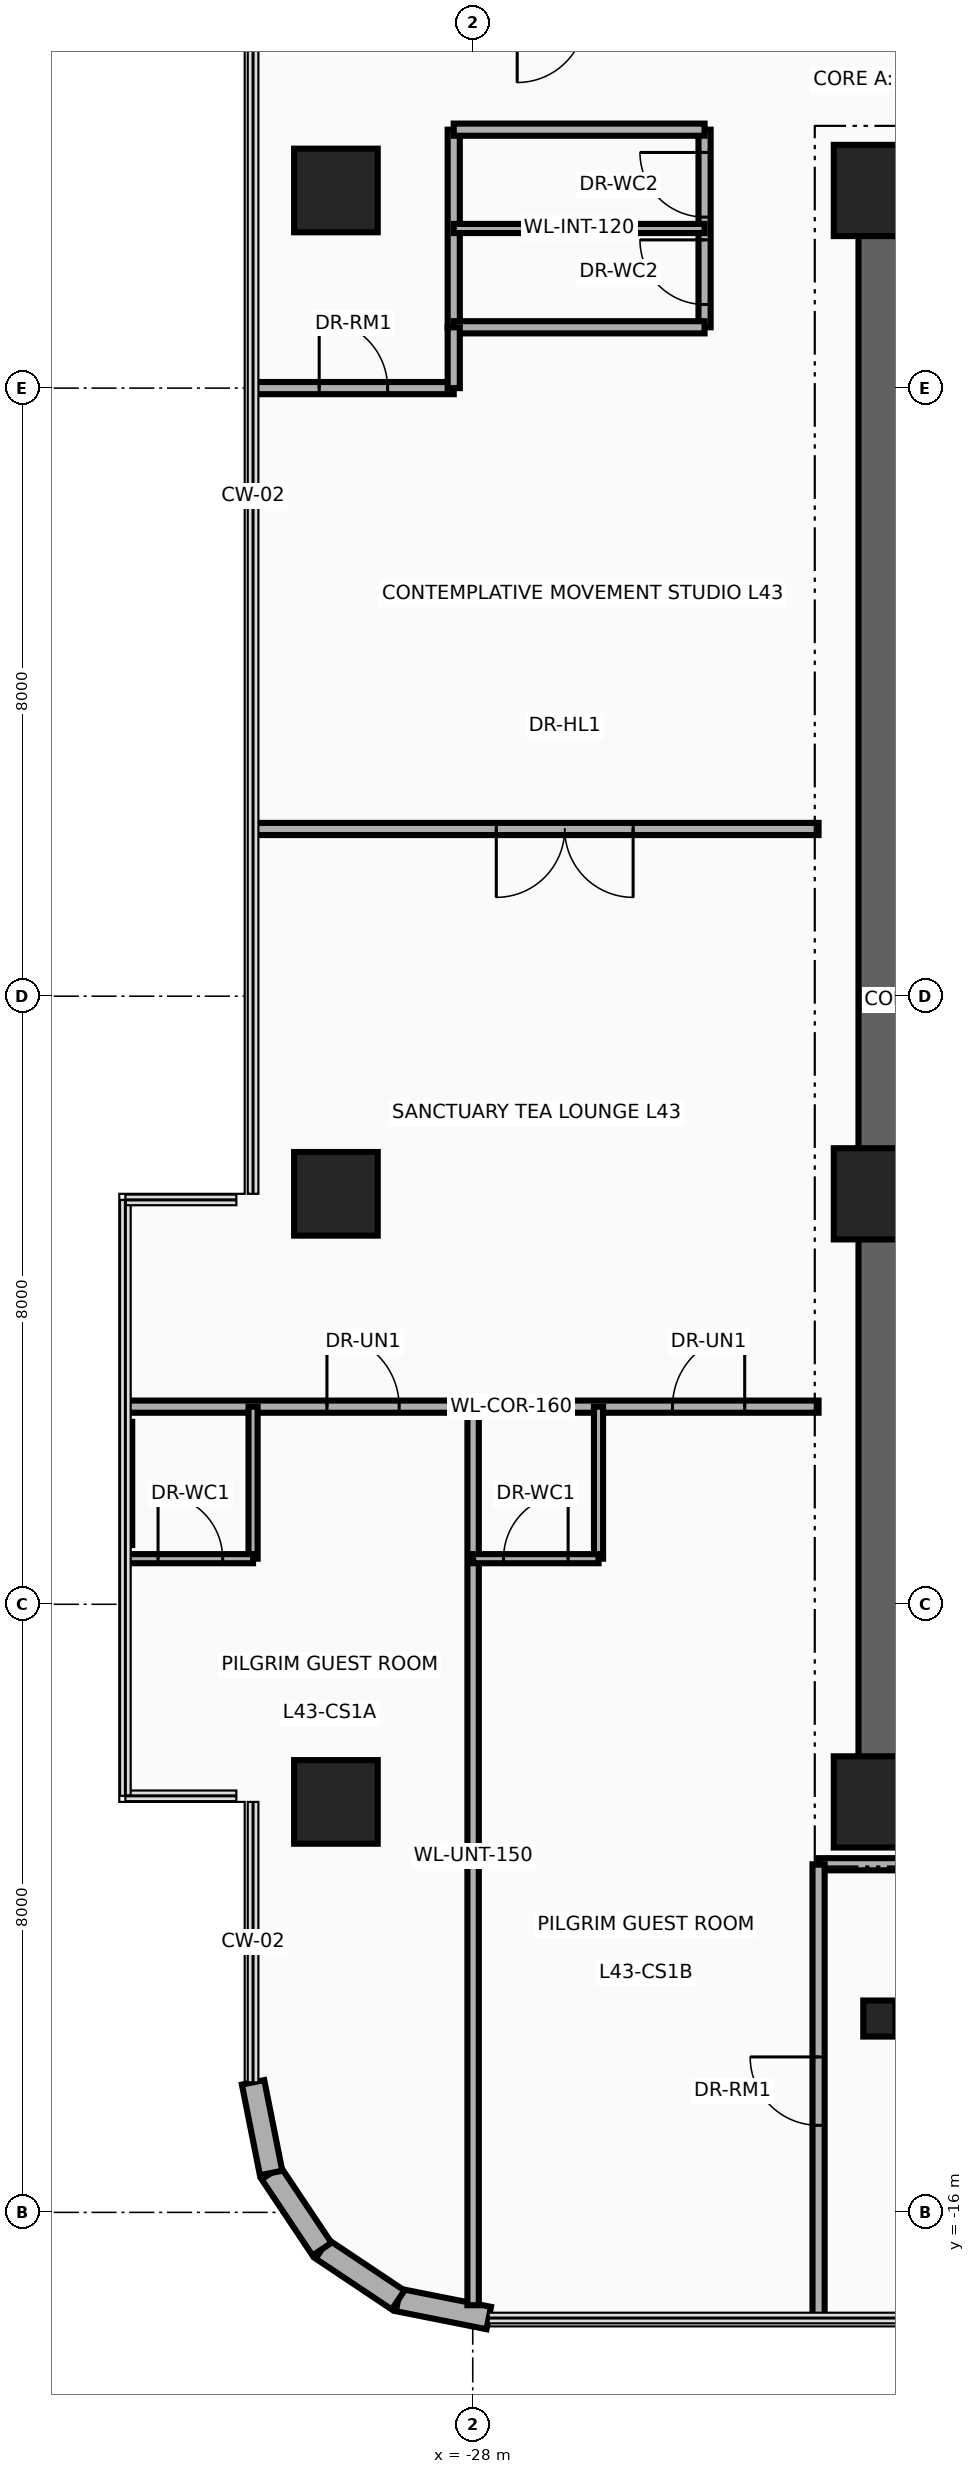
"""IFC4 building model, lengths in metres.
Left out: names, types, materials, properties, quantities, classifications, styles, units other than length and angle.
Written with IfcOpenShell. Run it as: python <this file> out.ifc"""

import sys

from ifc_helpers import new_model, si_unit, direction, frame, frame_2d, origin, origin_2d, place, context, subcontext, project, spatial, rectangle, circle, i_section, extrude, source, transform, mapped, element, fill, save


model = new_model("IFC4")
c1 = context("Model", 3, precision=1e-05, world=origin(), true_north=direction((0.0, 1.0)))
c2 = subcontext(c1, "Body", "Model", "MODEL_VIEW")
j1 = project(units=[si_unit("LENGTHUNIT", "METRE"), si_unit("PLANEANGLEUNIT", "RADIAN")], contexts=[c1])
p1 = place(None, origin())
s1 = spatial("IfcSite", under=j1, at=p1, CompositionType="ELEMENT")
p2 = place(p1, origin())
s2 = spatial("IfcBuilding", under=s1, at=p2, CompositionType="ELEMENT")
p3 = place(p2, frame((0.0, 0.0, 168.6)))
s3 = spatial("IfcBuildingStorey", under=s2, at=p3, CompositionType="ELEMENT", Elevation=168.6)
p4 = place(p3, frame((-22.65, -11.075, 0.0), z_axis=(0.0, 0.0, 1.0), x_axis=(0.0, 1.0, 0.0)))
e1 = element("IfcWall", 1, at=p4, inside=s3, PredefinedType="SHEAR", context=c2, shape_type="SweptSolid", body=[
    extrude(rectangle(XDim=22.15, YDim=0.55, at=frame_2d((11.075, 0.0))), origin(), (0.0, 0.0, 1.0), 3.3),
])
for number, where, z_axis, x_axis in (
    (2, (-22.65, 10.8, 0.0), (0.0, 0.0, 1.0), (1.0, 0.0, 0.0)),
    (3, (-22.65, -10.8, 0.0), (0.0, 0.0, 1.0), (1.0, 0.0, 0.0)),
):
    element("IfcWall", number, at=place(p3, frame(where, z_axis=z_axis, x_axis=x_axis)), inside=s3, PredefinedType="SHEAR", context=c2, shape_type="SweptSolid", body=[
        extrude(rectangle(XDim=10.25, YDim=0.55, at=frame_2d((5.125, 0.0))), origin(), (0.0, 0.0, 1.0), 3.3),
    ])
m1 = source(origin(), c2, "Body", "SweptSolid", [
    extrude(circle(Radius=0.55, at=origin_2d()), origin(), (0.0, 0.0, 1.0), 3.7),
])
p5 = place(p3, frame((-29.8, -10.6, 0.0), z_axis=(0.0, 0.0, 1.0), x_axis=(1.0, 0.0, 0.0)))
e4 = element("IfcColumn", 4, at=p5, inside=s3, PredefinedType="COLUMN", context=c2, shape_type="MappedRepresentation", body=[
    mapped(m1, transform((0.0, 0.0, 0.0), x_axis=(1.0, 0.0, 0.0), y_axis=(0.0, 1.0, 0.0), z_axis=(0.0, 0.0, 1.0), scale=1.0)),
])
m2 = source(origin(), c2, "Body", "SweptSolid", [
    extrude(rectangle(XDim=1.2, YDim=1.2, at=origin_2d()), origin(), (0.0, 0.0, 1.0), 3.7),
])
p6 = place(p3, frame((-22.65, -10.6, 0.0), z_axis=(0.0, 0.0, 1.0), x_axis=(1.0, 0.0, 0.0)))
e5 = element("IfcColumn", 5, at=p6, inside=s3, PredefinedType="COLUMN", context=c2, shape_type="MappedRepresentation", body=[
    mapped(m2, transform((0.0, 0.0, 0.0), x_axis=(1.0, 0.0, 0.0), y_axis=(0.0, 1.0, 0.0), z_axis=(0.0, 0.0, 1.0), scale=1.0)),
])
p7 = place(p3, frame((-29.8, -2.6, 0.0), z_axis=(0.0, 0.0, 1.0), x_axis=(1.0, 0.0, 0.0)))
e6 = element("IfcColumn", 6, at=p7, inside=s3, PredefinedType="COLUMN", context=c2, shape_type="MappedRepresentation", body=[
    mapped(m1, transform((0.0, 0.0, 0.0), x_axis=(1.0, 0.0, 0.0), y_axis=(0.0, 1.0, 0.0), z_axis=(0.0, 0.0, 1.0), scale=1.0)),
])
p8 = place(p3, frame((-22.65, -2.6, 0.0), z_axis=(0.0, 0.0, 1.0), x_axis=(1.0, 0.0, 0.0)))
e7 = element("IfcColumn", 7, at=p8, inside=s3, PredefinedType="COLUMN", context=c2, shape_type="MappedRepresentation", body=[
    mapped(m2, transform((0.0, 0.0, 0.0), x_axis=(1.0, 0.0, 0.0), y_axis=(0.0, 1.0, 0.0), z_axis=(0.0, 0.0, 1.0), scale=1.0)),
])
p9 = place(p3, frame((-29.8, 10.6, 0.0), z_axis=(0.0, 0.0, 1.0), x_axis=(1.0, 0.0, 0.0)))
e8 = element("IfcColumn", 8, at=p9, inside=s3, PredefinedType="COLUMN", context=c2, shape_type="MappedRepresentation", body=[
    mapped(m1, transform((0.0, 0.0, 0.0), x_axis=(1.0, 0.0, 0.0), y_axis=(0.0, 1.0, 0.0), z_axis=(0.0, 0.0, 1.0), scale=1.0)),
])
p10 = place(p3, frame((-22.65, 10.6, 0.0), z_axis=(0.0, 0.0, 1.0), x_axis=(1.0, 0.0, 0.0)))
e9 = element("IfcColumn", 9, at=p10, inside=s3, PredefinedType="COLUMN", context=c2, shape_type="MappedRepresentation", body=[
    mapped(m2, transform((0.0, 0.0, 0.0), x_axis=(1.0, 0.0, 0.0), y_axis=(0.0, 1.0, 0.0), z_axis=(0.0, 0.0, 1.0), scale=1.0)),
])
m3 = source(origin(), c2, "Body", "SweptSolid", [
    extrude(i_section(OverallWidth=0.424, OverallDepth=0.474, WebThickness=0.048, FlangeThickness=0.077, at=origin_2d()), origin(), (0.0, 0.0, 1.0), 3.7),
])
p11 = place(p3, frame((-22.65, -13.45, 0.0), z_axis=(0.0, 0.0, 1.0), x_axis=(1.0, 0.0, 0.0)))
e10 = element("IfcColumn", 10, at=p11, inside=s3, PredefinedType="COLUMN", context=c2, shape_type="MappedRepresentation", body=[
    mapped(m3, transform((0.0, 0.0, 0.0), x_axis=(1.0, 0.0, 0.0), y_axis=(0.0, 1.0, 0.0), z_axis=(0.0, 0.0, 1.0), scale=1.0)),
])
p12 = place(p3, frame((-27.789, -17.39, 0.0), z_axis=(0.0, 0.0, 1.0), x_axis=(-0.980804027463, 0.194996050505, 0.0)))
e11 = element("IfcWall", 11, at=p12, inside=s3, PredefinedType="SOLIDWALL", context=c2, shape_type="SweptSolid", body=[
    extrude(rectangle(XDim=1.216, YDim=0.3, at=frame_2d((0.608, 0.0))), origin(), (0.0, 0.0, 1.0), 3.3),
])
for number, where, z_axis, x_axis in (
    (12, (-28.982, -17.153, 0.0), (0.0, 0.0, 1.0), (-0.831, 0.556, 0.0)),
    (13, (-29.983, -16.483, 0.0), (0.0, 0.0, 1.0), (-0.556, 0.831, 0.0)),
):
    element("IfcWall", number, at=place(p3, frame(where, z_axis=z_axis, x_axis=x_axis)), inside=s3, PredefinedType="SOLIDWALL", context=c2, shape_type="SweptSolid", body=[
        extrude(rectangle(XDim=1.205, YDim=0.3, at=frame_2d((0.603, 0.0))), origin(), (0.0, 0.0, 1.0), 3.3),
    ])
p13 = place(p3, frame((-30.653, -15.482, 0.0), z_axis=(0.0, 0.0, 1.0), x_axis=(-0.194996050505, 0.980804027463, 0.0)))
e14 = element("IfcWall", 14, at=p13, inside=s3, PredefinedType="SOLIDWALL", context=c2, shape_type="SweptSolid", body=[
    extrude(rectangle(XDim=1.216, YDim=0.3, at=frame_2d((0.608, 0.0))), origin(), (0.0, 0.0, 1.0), 3.3),
])
p14 = place(p3, frame((-28.25, 8.8, 0.0), z_axis=(0.0, 0.0, 1.0), x_axis=(0.0, 1.0, 0.0)))
e15 = element("IfcWall", 15, at=p14, inside=s3, PredefinedType="PARTITIONING", context=c2, shape_type="SweptSolid", body=[
    extrude(rectangle(XDim=2.6, YDim=0.16, at=frame_2d((1.3, 0.0))), origin(), (0.0, 0.0, 1.0), 2.085),
])
p15 = place(p3, frame((-24.95, 8.8, 0.0), z_axis=(0.0, 0.0, 1.0), x_axis=(0.0, 1.0, 0.0)))
e16 = element("IfcWall", 16, at=p15, inside=s3, PredefinedType="PARTITIONING", context=c2, shape_type="SweptSolid", body=[
    extrude(rectangle(XDim=2.6, YDim=0.16, at=frame_2d((1.3, 0.0))), origin(), (0.0, 0.0, 1.0), 2.085),
])
p16 = place(p15, frame((0.3, 0.0, 0.0)))
e17 = element("IfcOpeningElement", 17, at=p16, cuts=e16, PredefinedType="OPENING", context=c2, shape_type="SweptSolid", body=[
    extrude(rectangle(XDim=0.85, YDim=2.04, at=frame_2d((0.425, 1.02))), frame((0.0, 0.095, 0.0), z_axis=(0.0, -1.0, 0.0), x_axis=(1.0, 0.0, 0.0)), (0.0, 0.0, 1.0), 0.19),
])
p17 = place(p15, frame((1.45, 0.0, 0.0)))
e18 = element("IfcOpeningElement", 18, at=p17, cuts=e16, PredefinedType="OPENING", context=c2, shape_type="SweptSolid", body=[
    extrude(rectangle(XDim=0.85, YDim=2.04, at=frame_2d((0.425, 1.02))), frame((0.0, 0.095, 0.0), z_axis=(0.0, -1.0, 0.0), x_axis=(1.0, 0.0, 0.0)), (0.0, 0.0, 1.0), 0.19),
])
for number, where, z_axis, x_axis in (
    (19, (-28.25, 8.8, 0.0), (0.0, 0.0, 1.0), (1.0, 0.0, 0.0)),
    (20, (-28.25, 11.4, 0.0), (0.0, 0.0, 1.0), (1.0, 0.0, 0.0)),
):
    element("IfcWall", number, at=place(p3, frame(where, z_axis=z_axis, x_axis=x_axis)), inside=s3, PredefinedType="PARTITIONING", context=c2, shape_type="SweptSolid", body=[
        extrude(rectangle(XDim=3.3, YDim=0.16, at=frame_2d((1.65, 0.0))), origin(), (0.0, 0.0, 1.0), 3.3),
    ])
p18 = place(p3, frame((-28.25, 10.1, 0.0), z_axis=(0.0, 0.0, 1.0), x_axis=(1.0, 0.0, 0.0)))
e21 = element("IfcWall", 21, at=p18, inside=s3, PredefinedType="PARTITIONING", context=c2, shape_type="SweptSolid", body=[
    extrude(rectangle(XDim=3.3, YDim=0.12, at=frame_2d((1.65, 0.0))), origin(), (0.0, 0.0, 1.0), 2.085),
])
p19 = place(p3, frame((-23.45, -11.42, 0.0), z_axis=(0.0, 0.0, 1.0), x_axis=(1.0, 0.0, 0.0)))
e22 = element("IfcWall", 22, at=p19, inside=s3, PredefinedType="PARTITIONING", context=c2, shape_type="SweptSolid", body=[
    extrude(rectangle(XDim=13.84, YDim=0.16, at=frame_2d((6.92, 0.0))), origin(), (0.0, 0.0, 1.0), 2.674),
])
p20 = place(p3, frame((-23.45, -17.39, 0.0), z_axis=(0.0, 0.0, 1.0), x_axis=(0.0, 1.0, 0.0)))
e23 = element("IfcWall", 23, at=p20, inside=s3, PredefinedType="PARTITIONING", context=c2, shape_type="SweptSolid", body=[
    extrude(rectangle(XDim=5.97, YDim=0.16, at=frame_2d((2.985, 0.0))), origin(), (0.0, 0.0, 1.0), 3.3),
])
p21 = place(p20, frame((2.535, 0.0, 0.0)))
e24 = element("IfcOpeningElement", 24, at=p21, cuts=e23, PredefinedType="OPENING", context=c2, shape_type="SweptSolid", body=[
    extrude(rectangle(XDim=0.9, YDim=2.1, at=frame_2d((0.45, 1.05))), frame((0.0, 0.095, 0.0), z_axis=(0.0, -1.0, 0.0), x_axis=(1.0, 0.0, 0.0)), (0.0, 0.0, 1.0), 0.19),
])
p22 = place(p3, frame((-32.54, -5.4, 0.0), z_axis=(0.0, 0.0, 1.0), x_axis=(1.0, 0.0, 0.0)))
e25 = element("IfcWall", 25, at=p22, inside=s3, PredefinedType="PARTITIONING", context=c2, shape_type="SweptSolid", body=[
    extrude(rectangle(XDim=9.09, YDim=0.16, at=frame_2d((4.545, 0.0))), origin(), (0.0, 0.0, 1.0), 2.746),
])
p23 = place(p22, frame((2.622, 0.0, 0.0)))
e26 = element("IfcOpeningElement", 26, at=p23, cuts=e25, PredefinedType="OPENING", context=c2, shape_type="SweptSolid", body=[
    extrude(rectangle(XDim=0.95, YDim=2.15, at=frame_2d((0.475, 1.075))), frame((0.0, 0.095, 0.0), z_axis=(0.0, -1.0, 0.0), x_axis=(1.0, 0.0, 0.0)), (0.0, 0.0, 1.0), 0.19),
])
p24 = place(p22, frame((7.168, 0.0, 0.0)))
e27 = element("IfcOpeningElement", 27, at=p24, cuts=e25, PredefinedType="OPENING", context=c2, shape_type="SweptSolid", body=[
    extrude(rectangle(XDim=0.95, YDim=2.15, at=frame_2d((0.475, 1.075))), frame((0.0, 0.095, 0.0), z_axis=(0.0, -1.0, 0.0), x_axis=(1.0, 0.0, 0.0)), (0.0, 0.0, 1.0), 0.19),
])
p25 = place(p3, frame((-30.89, 8.0, 0.0), z_axis=(0.0, 0.0, 1.0), x_axis=(1.0, 0.0, 0.0)))
e28 = element("IfcWall", 28, at=p25, inside=s3, PredefinedType="PARTITIONING", context=c2, shape_type="SweptSolid", body=[
    extrude(rectangle(XDim=2.64, YDim=0.16, at=frame_2d((1.32, 0.0))), origin(), (0.0, 0.0, 1.0), 2.746),
])
p26 = place(p25, frame((0.87, 0.0, 0.0)))
e29 = element("IfcOpeningElement", 29, at=p26, cuts=e28, PredefinedType="OPENING", context=c2, shape_type="SweptSolid", body=[
    extrude(rectangle(XDim=0.9, YDim=2.1, at=frame_2d((0.45, 1.05))), frame((0.0, 0.095, 0.0), z_axis=(0.0, -1.0, 0.0), x_axis=(1.0, 0.0, 0.0)), (0.0, 0.0, 1.0), 0.19),
])
p27 = place(p3, frame((-28.25, 8.0, 0.0), z_axis=(0.0, 0.0, 1.0), x_axis=(0.0, 1.0, 0.0)))
e30 = element("IfcWall", 30, at=p27, inside=s3, PredefinedType="PARTITIONING", context=c2, shape_type="SweptSolid", body=[
    extrude(rectangle(XDim=0.8, YDim=0.16, at=frame_2d((0.4, 0.0))), origin(), (0.0, 0.0, 1.0), 2.828),
])
p28 = place(p3, frame((-27.995, -17.222, 0.0), z_axis=(0.0, 0.0, 1.0), x_axis=(0.0, 1.0, 0.0)))
e31 = element("IfcWall", 31, at=p28, inside=s3, PredefinedType="PARTITIONING", context=c2, shape_type="SweptSolid", body=[
    extrude(rectangle(XDim=11.822, YDim=0.15, at=frame_2d((5.911, 0.0))), origin(), (0.0, 0.0, 1.0), 2.085),
])
p29 = place(p3, frame((-30.89, -7.4, 0.0), z_axis=(0.0, 0.0, 1.0), x_axis=(0.0, 1.0, 0.0)))
e32 = element("IfcWall", 32, at=p29, inside=s3, PredefinedType="PARTITIONING", context=c2, shape_type="SweptSolid", body=[
    extrude(rectangle(XDim=2.0, YDim=0.12, at=frame_2d((1.0, 0.0))), origin(), (0.0, 0.0, 1.0), 3.3),
])
p30 = place(p3, frame((-32.54, -7.4, 0.0), z_axis=(0.0, 0.0, 1.0), x_axis=(1.0, 0.0, 0.0)))
e33 = element("IfcWall", 33, at=p30, inside=s3, PredefinedType="PARTITIONING", context=c2, shape_type="SweptSolid", body=[
    extrude(rectangle(XDim=1.65, YDim=0.12, at=frame_2d((0.825, 0.0))), origin(), (0.0, 0.0, 1.0), 3.3),
])
p31 = place(p30, frame((0.4, 0.0, 0.0)))
e34 = element("IfcOpeningElement", 34, at=p31, cuts=e33, PredefinedType="OPENING", context=c2, shape_type="SweptSolid", body=[
    extrude(rectangle(XDim=0.85, YDim=2.1, at=frame_2d((0.425, 1.05))), frame((0.0, 0.075, 0.0), z_axis=(0.0, -1.0, 0.0), x_axis=(1.0, 0.0, 0.0)), (0.0, 0.0, 1.0), 0.15),
])
p32 = place(p3, frame((-32.54, -7.22, 0.0), z_axis=(0.0, 0.0, 1.0), x_axis=(0.0, 1.0, 0.0)))
e35 = element("IfcWall", 35, at=p32, inside=s3, PredefinedType="PARTITIONING", context=c2, shape_type="SweptSolid", body=[
    extrude(rectangle(XDim=1.62, YDim=0.12, at=frame_2d((0.81, 0.0))), origin(), (0.0, 0.0, 1.0), 3.3),
])
p33 = place(p3, frame((-26.345, -7.4, 0.0), z_axis=(0.0, 0.0, 1.0), x_axis=(0.0, 1.0, 0.0)))
e36 = element("IfcWall", 36, at=p33, inside=s3, PredefinedType="PARTITIONING", context=c2, shape_type="SweptSolid", body=[
    extrude(rectangle(XDim=2.0, YDim=0.12, at=frame_2d((1.0, 0.0))), origin(), (0.0, 0.0, 1.0), 2.828),
])
p34 = place(p3, frame((-27.995, -7.4, 0.0), z_axis=(0.0, 0.0, 1.0), x_axis=(1.0, 0.0, 0.0)))
e37 = element("IfcWall", 37, at=p34, inside=s3, PredefinedType="PARTITIONING", context=c2, shape_type="SweptSolid", body=[
    extrude(rectangle(XDim=1.65, YDim=0.12, at=frame_2d((0.825, 0.0))), origin(), (0.0, 0.0, 1.0), 3.3),
])
p35 = place(p34, frame((0.4, 0.0, 0.0)))
e38 = element("IfcOpeningElement", 38, at=p35, cuts=e37, PredefinedType="OPENING", context=c2, shape_type="SweptSolid", body=[
    extrude(rectangle(XDim=0.85, YDim=2.1, at=frame_2d((0.425, 1.05))), frame((0.0, 0.075, 0.0), z_axis=(0.0, -1.0, 0.0), x_axis=(1.0, 0.0, 0.0)), (0.0, 0.0, 1.0), 0.15),
])
p36 = place(p3, frame((-30.89, 2.2, 0.0), z_axis=(0.0, 0.0, 1.0), x_axis=(1.0, 0.0, 0.0)))
e39 = element("IfcWall", 39, at=p36, inside=s3, PredefinedType="PARTITIONING", context=c2, shape_type="SweptSolid", body=[
    extrude(rectangle(XDim=7.44, YDim=0.16, at=frame_2d((3.72, 0.0))), origin(), (0.0, 0.0, 1.0), 2.746),
])
p37 = place(p36, frame((3.2, 0.0, 0.0)))
e40 = element("IfcOpeningElement", 40, at=p37, cuts=e39, PredefinedType="OPENING", context=c2, shape_type="SweptSolid", body=[
    extrude(rectangle(XDim=1.8, YDim=2.15, at=frame_2d((0.9, 1.075))), frame((0.0, 0.095, 0.0), z_axis=(0.0, -1.0, 0.0), x_axis=(1.0, 0.0, 0.0)), (0.0, 0.0, 1.0), 0.19),
])
p38 = place(p16, origin())
e41 = element("IfcDoor", 41, at=p38, inside=s3, OperationType="SINGLE_SWING_RIGHT", PredefinedType="DOOR", context=c2, shape_type="SweptSolid", body=[
    extrude(rectangle(XDim=0.85, YDim=2.04, at=frame_2d((0.425, 1.02))), frame((0.0, 0.025, 0.0), z_axis=(0.0, -1.0, 0.0), x_axis=(1.0, 0.0, 0.0)), (0.0, 0.0, 1.0), 0.05),
])
fill(e17, e41)
p39 = place(p17, origin())
e42 = element("IfcDoor", 42, at=p39, inside=s3, OperationType="SINGLE_SWING_LEFT", PredefinedType="DOOR", context=c2, shape_type="SweptSolid", body=[
    extrude(rectangle(XDim=0.85, YDim=2.04, at=frame_2d((0.425, 1.02))), frame((0.0, 0.025, 0.0), z_axis=(0.0, -1.0, 0.0), x_axis=(1.0, 0.0, 0.0)), (0.0, 0.0, 1.0), 0.05),
])
fill(e18, e42)
p40 = place(p23, origin())
e43 = element("IfcDoor", 43, at=p40, inside=s3, OperationType="SINGLE_SWING_RIGHT", PredefinedType="DOOR", context=c2, shape_type="SweptSolid", body=[
    extrude(rectangle(XDim=0.95, YDim=2.15, at=frame_2d((0.475, 1.075))), frame((0.0, 0.025, 0.0), z_axis=(0.0, -1.0, 0.0), x_axis=(1.0, 0.0, 0.0)), (0.0, 0.0, 1.0), 0.05),
])
fill(e26, e43)
p41 = place(p31, origin())
e44 = element("IfcDoor", 44, at=p41, inside=s3, OperationType="SINGLE_SWING_LEFT", PredefinedType="DOOR", context=c2, shape_type="SweptSolid", body=[
    extrude(rectangle(XDim=0.85, YDim=2.1, at=frame_2d((0.425, 1.05))), frame((0.0, 0.025, 0.0), z_axis=(0.0, -1.0, 0.0), x_axis=(1.0, 0.0, 0.0)), (0.0, 0.0, 1.0), 0.05),
])
fill(e34, e44)
p42 = place(p24, origin())
e45 = element("IfcDoor", 45, at=p42, inside=s3, OperationType="SINGLE_SWING_RIGHT", PredefinedType="DOOR", context=c2, shape_type="SweptSolid", body=[
    extrude(rectangle(XDim=0.95, YDim=2.15, at=frame_2d((0.475, 1.075))), frame((0.0, 0.025, 0.0), z_axis=(0.0, -1.0, 0.0), x_axis=(1.0, 0.0, 0.0)), (0.0, 0.0, 1.0), 0.05),
])
fill(e27, e45)
p43 = place(p35, origin())
e46 = element("IfcDoor", 46, at=p43, inside=s3, OperationType="SINGLE_SWING_LEFT", PredefinedType="DOOR", context=c2, shape_type="SweptSolid", body=[
    extrude(rectangle(XDim=0.85, YDim=2.1, at=frame_2d((0.425, 1.05))), frame((0.0, 0.025, 0.0), z_axis=(0.0, -1.0, 0.0), x_axis=(1.0, 0.0, 0.0)), (0.0, 0.0, 1.0), 0.05),
])
fill(e38, e46)
p44 = place(p26, origin())
e47 = element("IfcDoor", 47, at=p44, inside=s3, OperationType="SINGLE_SWING_RIGHT", PredefinedType="DOOR", context=c2, shape_type="SweptSolid", body=[
    extrude(rectangle(XDim=0.9, YDim=2.1, at=frame_2d((0.45, 1.05))), frame((0.0, 0.025, 0.0), z_axis=(0.0, -1.0, 0.0), x_axis=(1.0, 0.0, 0.0)), (0.0, 0.0, 1.0), 0.05),
])
fill(e29, e47)
p45 = place(p37, frame((1.8, 0.0, 0.0), z_axis=(0.0, 0.0, 1.0), x_axis=(-1.0, 0.0, 0.0)))
e48 = element("IfcDoor", 48, at=p45, inside=s3, OperationType="DOUBLE_DOOR_SINGLE_SWING", PredefinedType="DOOR", context=c2, shape_type="SweptSolid", body=[
    extrude(rectangle(XDim=1.8, YDim=2.15, at=frame_2d((0.9, 1.075))), frame((0.0, 0.025, 0.0), z_axis=(0.0, -1.0, 0.0), x_axis=(1.0, 0.0, 0.0)), (0.0, 0.0, 1.0), 0.05),
])
fill(e40, e48)
p46 = place(p21, origin())
e49 = element("IfcDoor", 49, at=p46, inside=s3, OperationType="SINGLE_SWING_RIGHT", PredefinedType="DOOR", context=c2, shape_type="SweptSolid", body=[
    extrude(rectangle(XDim=0.9, YDim=2.1, at=frame_2d((0.45, 1.05))), frame((0.0, 0.025, 0.0), z_axis=(0.0, -1.0, 0.0), x_axis=(1.0, 0.0, 0.0)), (0.0, 0.0, 1.0), 0.05),
])
fill(e24, e49)
save(model, sys.argv[1])
